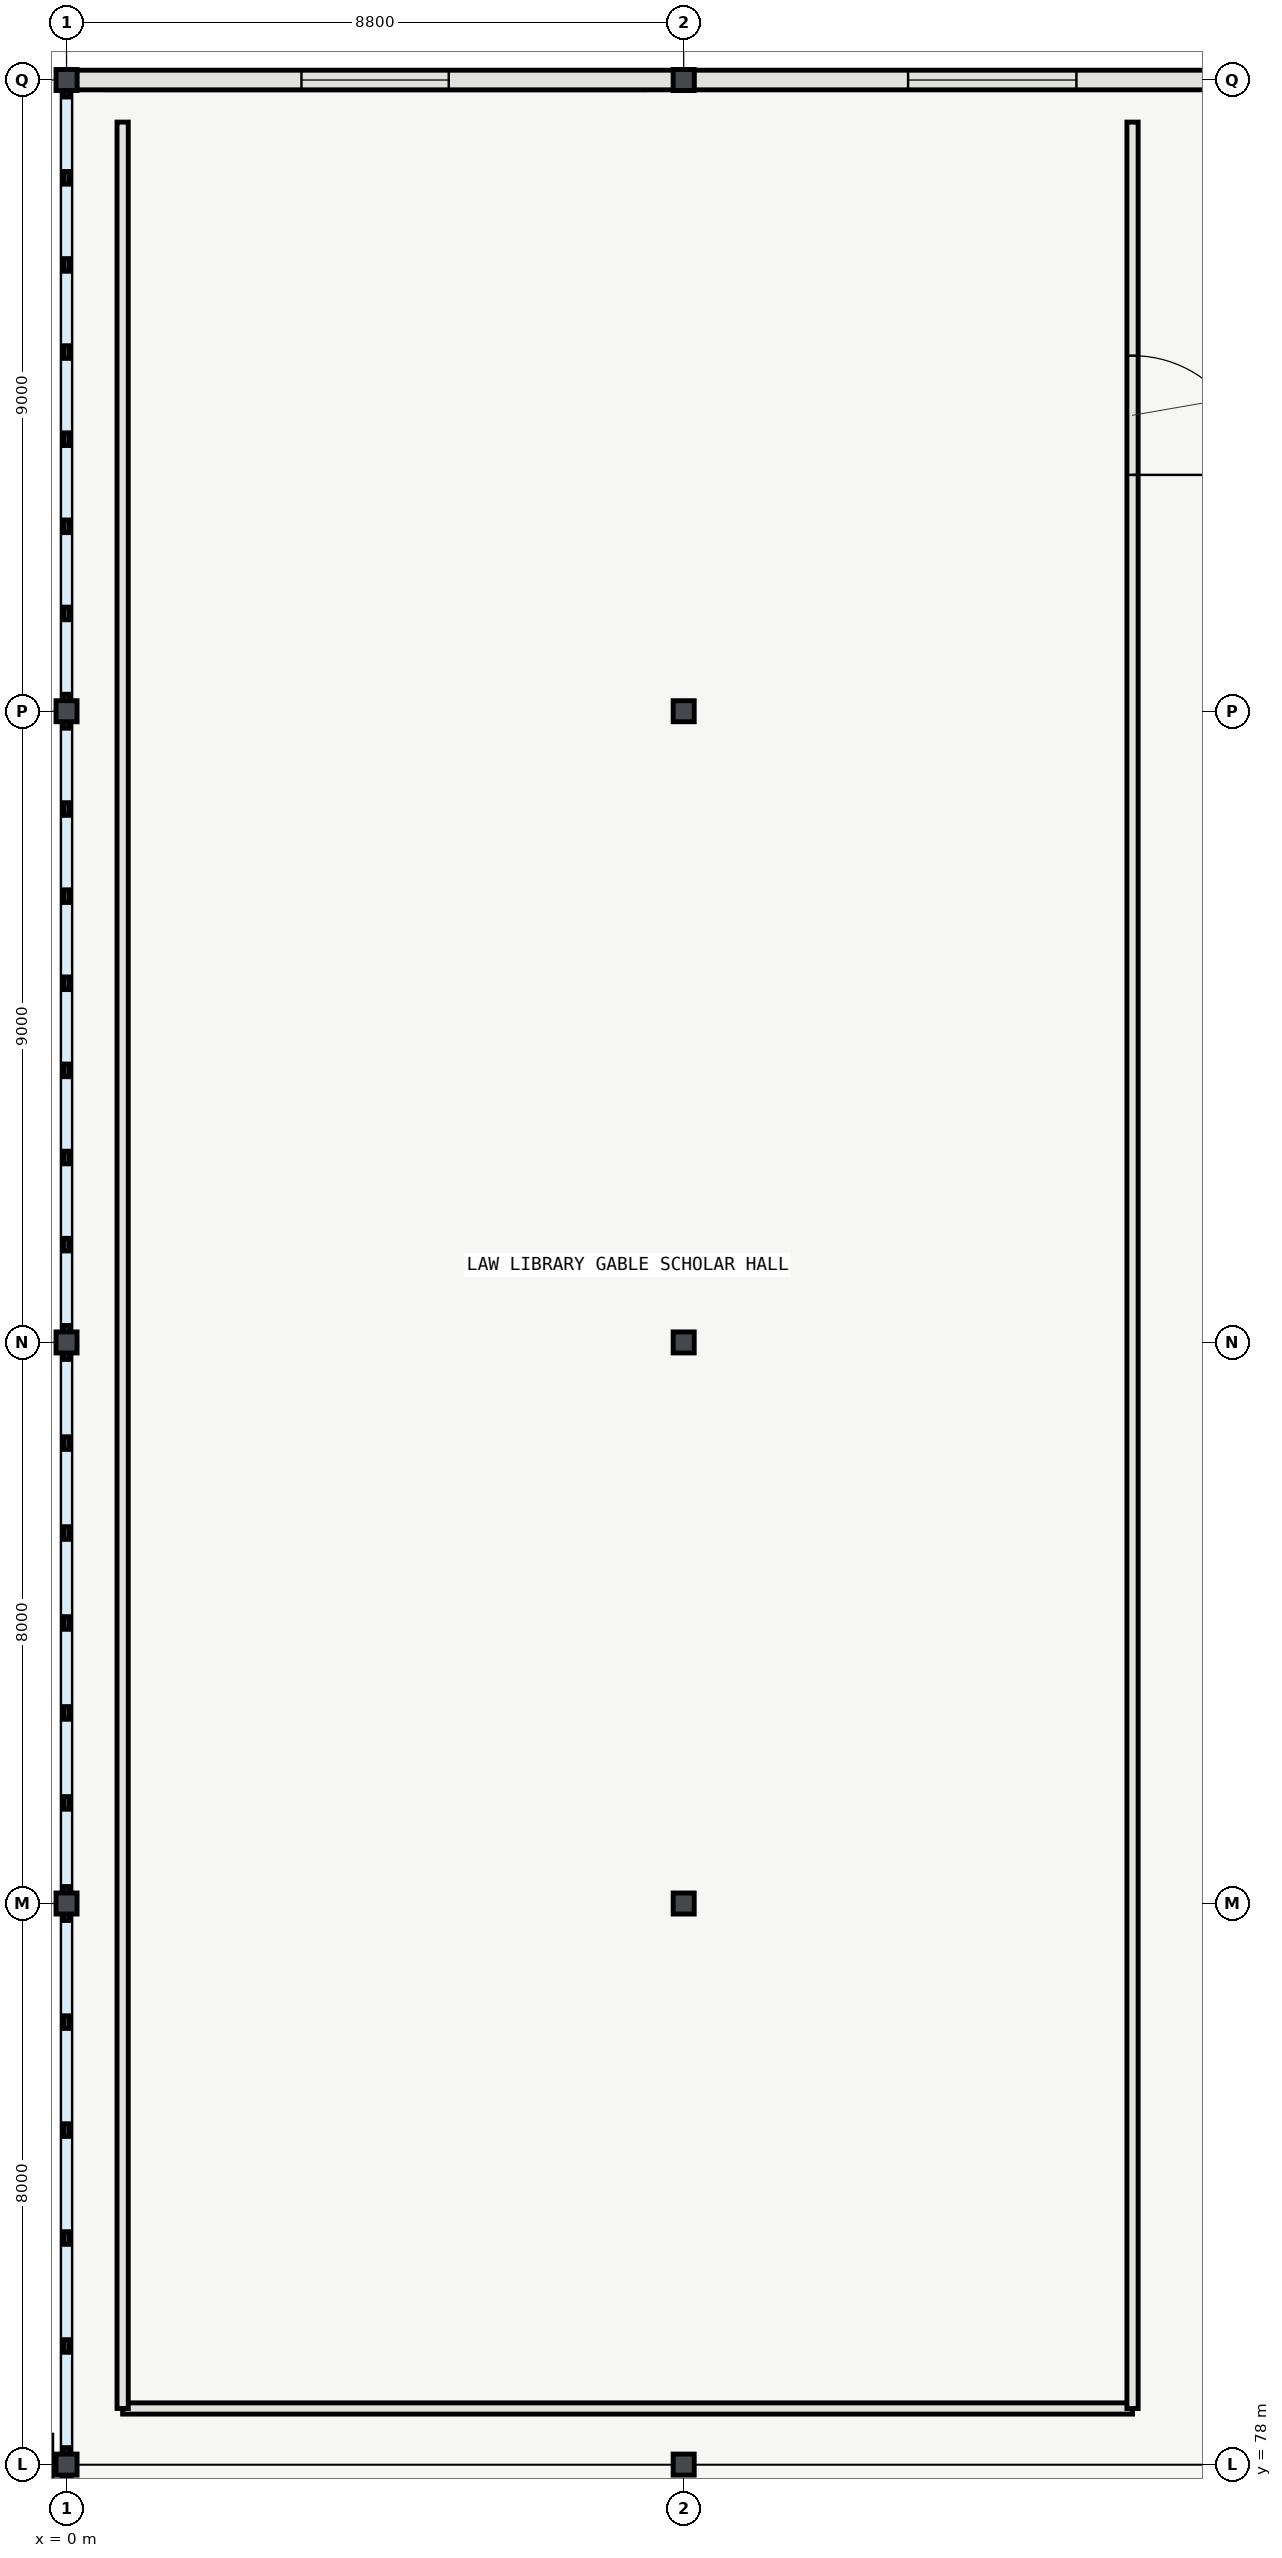
"""IFC4 building model, lengths in metres.
Left out: names, types, materials, properties, quantities, classifications, styles, units other than length and angle.
Written with IfcOpenShell. Run it as: python <this file> out.ifc"""

import sys

from ifc_helpers import new_model, si_unit, direction, frame, frame_2d, origin, origin_2d, place, context, subcontext, project, spatial, rectangle, i_section, extrude, element, fill, save


model = new_model("IFC4")
c1 = context("Model", 3, precision=1e-05, world=origin(), true_north=direction((0.0, 1.0)))
c2 = subcontext(c1, "Body", "Model", "MODEL_VIEW")
j1 = project(units=[si_unit("LENGTHUNIT", "METRE"), si_unit("PLANEANGLEUNIT", "RADIAN")], contexts=[c1])
p1 = place(None, origin())
s1 = spatial("IfcSite", under=j1, at=p1, CompositionType="ELEMENT")
p2 = place(p1, origin())
s2 = spatial("IfcBuilding", under=s1, at=p2, CompositionType="ELEMENT")
p3 = place(p2, frame((0.0, 0.0, 20.4)))
s3 = spatial("IfcBuildingStorey", under=s2, at=p3, CompositionType="ELEMENT", Elevation=20.4)
for number, where, z_axis, x_axis in (
    (1, (0.0, 78.0, 0.0), (0.0, 0.0, 1.0), (1.0, 0.0, 0.0)),
    (2, (0.0, 86.0, 0.0), (0.0, 0.0, 1.0), (1.0, 0.0, 0.0)),
    (3, (0.0, 94.0, 0.0), (0.0, 0.0, 1.0), (1.0, 0.0, 0.0)),
    (4, (0.0, 103.0, 0.0), (0.0, 0.0, 1.0), (1.0, 0.0, 0.0)),
    (5, (0.0, 112.0, 0.0), (0.0, 0.0, 1.0), (1.0, 0.0, 0.0)),
    (6, (8.8, 78.0, 0.0), (0.0, 0.0, 1.0), (1.0, 0.0, 0.0)),
    (7, (8.8, 86.0, 0.0), (0.0, 0.0, 1.0), (1.0, 0.0, 0.0)),
    (8, (8.8, 94.0, 0.0), (0.0, 0.0, 1.0), (1.0, 0.0, 0.0)),
    (9, (8.8, 103.0, 0.0), (0.0, 0.0, 1.0), (1.0, 0.0, 0.0)),
    (10, (8.8, 112.0, 0.0), (0.0, 0.0, 1.0), (1.0, 0.0, 0.0)),
):
    element("IfcColumn", number, at=place(p3, frame(where, z_axis=z_axis, x_axis=x_axis)), inside=s3, PredefinedType="COLUMN", context=c2, shape_type="SweptSolid", body=[
        extrude(i_section(OverallWidth=0.3, OverallDepth=0.3, WebThickness=0.01, FlangeThickness=0.015, FilletRadius=0.018, at=origin_2d()), origin(), (0.0, 0.0, 1.0), 4.2),
    ])
p4 = place(p3, frame((8.654, 112.0, 0.0), z_axis=(0.0, 0.0, 1.0), x_axis=(-1.0, 0.0, 0.0)))
e11 = element("IfcWall", 11, at=p4, inside=s3, PredefinedType="SOLIDWALL", context=c2, shape_type="SweptSolid", body=[
    extrude(rectangle(XDim=8.508, YDim=0.28, at=frame_2d((4.254, 0.0))), origin(), (0.0, 0.0, 1.0), 3.423),
])
p5 = place(p4, frame((3.204, 0.0, 0.95)))
e12 = element("IfcOpeningElement", 12, at=p5, cuts=e11, PredefinedType="OPENING", context=c2, shape_type="SweptSolid", body=[
    extrude(rectangle(XDim=2.1, YDim=1.2, at=frame_2d((1.05, 0.6))), frame((0.0, 0.15, 0.0), z_axis=(0.0, -1.0, 0.0), x_axis=(1.0, 0.0, 0.0)), (0.0, 0.0, 1.0), 0.3),
])
p6 = place(p3, frame((17.454, 112.0, 0.0), z_axis=(0.0, 0.0, 1.0), x_axis=(-1.0, 0.0, 0.0)))
e13 = element("IfcWall", 13, at=p6, inside=s3, PredefinedType="SOLIDWALL", context=c2, shape_type="SweptSolid", body=[
    extrude(rectangle(XDim=8.508, YDim=0.28, at=frame_2d((4.254, 0.0))), origin(), (0.0, 0.0, 1.0), 3.423),
])
p7 = place(p6, frame((3.054, 0.0, 0.95)))
e14 = element("IfcOpeningElement", 14, at=p7, cuts=e13, PredefinedType="OPENING", context=c2, shape_type="SweptSolid", body=[
    extrude(rectangle(XDim=2.4, YDim=1.5, at=frame_2d((1.2, 0.75))), frame((0.0, 0.15, 0.0), z_axis=(0.0, -1.0, 0.0), x_axis=(1.0, 0.0, 0.0)), (0.0, 0.0, 1.0), 0.3),
])
p8 = place(p3, frame((0.8, 78.8, 0.0), z_axis=(0.0, 0.0, 1.0), x_axis=(1.0, 0.0, 0.0)))
e15 = element("IfcWall", 15, at=p8, inside=s3, PredefinedType="PARTITIONING", context=c2, shape_type="SweptSolid", body=[
    extrude(rectangle(XDim=14.4, YDim=0.16, at=frame_2d((7.2, 0.0))), origin(), (0.0, 0.0, 1.0), 3.92),
])
p9 = place(p3, frame((0.8, 111.4, 0.0), z_axis=(0.0, 0.0, 1.0), x_axis=(0.0, -1.0, 0.0)))
e16 = element("IfcWall", 16, at=p9, inside=s3, PredefinedType="PARTITIONING", context=c2, shape_type="SweptSolid", body=[
    extrude(rectangle(XDim=32.6, YDim=0.16, at=frame_2d((16.3, 0.0))), origin(), (0.0, 0.0, 1.0), 3.92),
])
p10 = place(p3, frame((15.2, 78.8, 0.0), z_axis=(0.0, 0.0, 1.0), x_axis=(0.0, 1.0, 0.0)))
e17 = element("IfcWall", 17, at=p10, inside=s3, PredefinedType="PARTITIONING", context=c2, shape_type="SweptSolid", body=[
    extrude(rectangle(XDim=32.6, YDim=0.16, at=frame_2d((16.3, 0.0))), origin(), (0.0, 0.0, 1.0), 3.92),
])
p11 = place(p10, frame((27.57, 0.0, 0.0)))
e18 = element("IfcOpeningElement", 18, at=p11, cuts=e17, PredefinedType="OPENING", context=c2, shape_type="SweptSolid", body=[
    extrude(rectangle(XDim=1.7, YDim=2.3, at=frame_2d((0.85, 1.15))), frame((0.0, 0.09, 0.0), z_axis=(0.0, -1.0, 0.0), x_axis=(1.0, 0.0, 0.0)), (0.0, 0.0, 1.0), 0.18),
])
p12 = place(p5, origin())
e19 = element("IfcWindow", 19, at=p12, inside=s3, PartitioningType="SINGLE_PANEL", PredefinedType="WINDOW", context=c2, shape_type="SweptSolid", body=[
    extrude(rectangle(XDim=2.1, YDim=1.2, at=frame_2d((1.05, 0.6))), frame((0.0, 0.03, 0.0), z_axis=(0.0, -1.0, 0.0), x_axis=(1.0, 0.0, 0.0)), (0.0, 0.0, 1.0), 0.06),
])
fill(e12, e19)
p13 = place(p7, origin())
e20 = element("IfcWindow", 20, at=p13, inside=s3, PartitioningType="SINGLE_PANEL", PredefinedType="WINDOW", context=c2, shape_type="SweptSolid", body=[
    extrude(rectangle(XDim=2.4, YDim=1.5, at=frame_2d((1.2, 0.75))), frame((0.0, 0.03, 0.0), z_axis=(0.0, -1.0, 0.0), x_axis=(1.0, 0.0, 0.0)), (0.0, 0.0, 1.0), 0.06),
])
fill(e14, e20)
p14 = place(p11, origin())
e21 = element("IfcDoor", 21, at=p14, inside=s3, OperationType="DOUBLE_DOOR_SINGLE_SWING", PredefinedType="DOOR", context=c2, shape_type="SweptSolid", body=[
    extrude(rectangle(XDim=1.7, YDim=2.3, at=frame_2d((0.85, 1.15))), frame((0.0, 0.025, 0.0), z_axis=(0.0, -1.0, 0.0), x_axis=(1.0, 0.0, 0.0)), (0.0, 0.0, 1.0), 0.05),
])
fill(e18, e21)
save(model, sys.argv[1])
